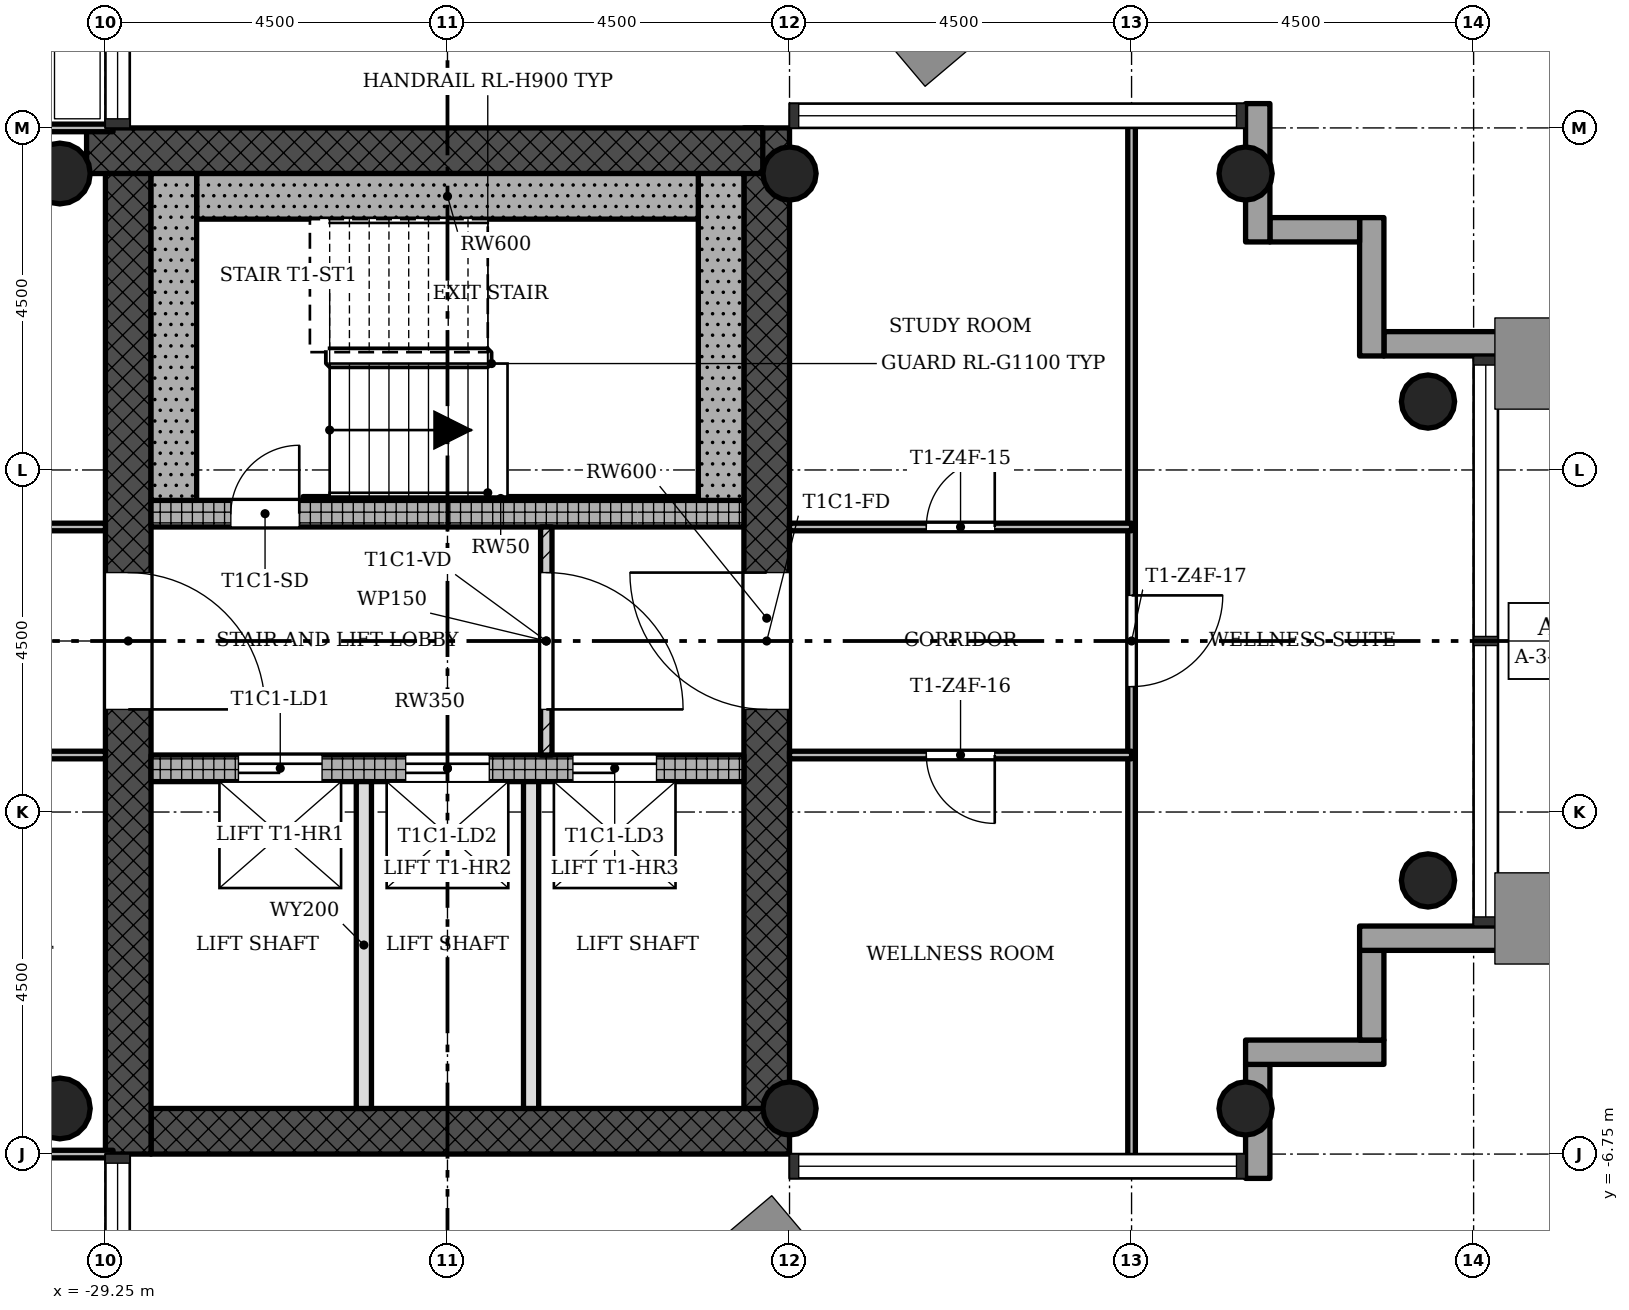
"""IFC4 building model, lengths in metres.
Left out: names, types, materials, properties, quantities, classifications, styles, units other than length and angle.
Written with IfcOpenShell. Run it as: python <this file> out.ifc"""

import sys

from ifc_helpers import new_model, si_unit, direction, frame, frame_2d, origin, origin_2d, place, context, subcontext, project, spatial, rectangle, hollow_circle, extrude, element, fill, save


model = new_model("IFC4")
c1 = context("Model", 3, precision=1e-05, world=origin(), true_north=direction((0.0, 1.0)))
c2 = subcontext(c1, "Body", "Model", "MODEL_VIEW")
j1 = project(units=[si_unit("LENGTHUNIT", "METRE"), si_unit("PLANEANGLEUNIT", "RADIAN")], contexts=[c1])
p1 = place(None, origin())
s1 = spatial("IfcSite", under=j1, at=p1, CompositionType="ELEMENT")
p2 = place(p1, origin())
s2 = spatial("IfcBuilding", under=s1, at=p2, CompositionType="ELEMENT")
p3 = place(p2, frame((0.0, 0.0, 223.2)))
s3 = spatial("IfcBuildingStorey", under=s2, at=p3, CompositionType="ELEMENT", Elevation=223.2)
p4 = place(p3, frame((-28.65, -6.45, 0.0), z_axis=(0.0, 0.0, 1.0), x_axis=(1.0, 0.0, 0.0)))
e1 = element("IfcWall", 1, at=p4, inside=s3, PredefinedType="SHEAR", context=c2, shape_type="SweptSolid", body=[
    extrude(rectangle(XDim=8.4, YDim=0.6, at=frame_2d((4.2, 0.0))), origin(), (0.0, 0.0, 1.0), 3.4),
])
p5 = place(p3, frame((-20.55, -6.15, 0.0), z_axis=(0.0, 0.0, 1.0), x_axis=(0.0, 1.0, 0.0)))
e2 = element("IfcWall", 2, at=p5, inside=s3, PredefinedType="SHEAR", context=c2, shape_type="SweptSolid", body=[
    extrude(rectangle(XDim=12.9, YDim=0.6, at=frame_2d((6.45, 0.0))), origin(), (0.0, 0.0, 1.0), 3.4),
])
p6 = place(p5, frame((5.25, 0.0, 0.0)))
e3 = element("IfcOpeningElement", 3, at=p6, cuts=e2, PredefinedType="OPENING", context=c2, shape_type="SweptSolid", body=[
    extrude(rectangle(XDim=1.8, YDim=2.1, at=frame_2d((0.9, 1.05))), frame((0.0, 0.31, 0.0), z_axis=(0.0, -1.0, 0.0), x_axis=(1.0, 0.0, 0.0)), (0.0, 0.0, 1.0), 0.62),
])
p7 = place(p3, frame((-20.602, 6.45, 0.0), z_axis=(0.0, 0.0, 1.0), x_axis=(-1.0, 0.0, 0.0)))
e4 = element("IfcWall", 4, at=p7, inside=s3, PredefinedType="SHEAR", context=c2, shape_type="SweptSolid", body=[
    extrude(rectangle(XDim=8.896, YDim=0.6, at=frame_2d((4.448, 0.0))), origin(), (0.0, 0.0, 1.0), 3.4),
])
p8 = place(p3, frame((-28.95, 6.15, 0.0), z_axis=(0.0, 0.0, 1.0), x_axis=(0.0, -1.0, 0.0)))
e5 = element("IfcWall", 5, at=p8, inside=s3, PredefinedType="SHEAR", context=c2, shape_type="SweptSolid", body=[
    extrude(rectangle(XDim=12.9, YDim=0.6, at=frame_2d((6.45, 0.0))), origin(), (0.0, 0.0, 1.0), 3.4),
])
p9 = place(p8, frame((5.25, 0.0, 0.0)))
e6 = element("IfcOpeningElement", 6, at=p9, cuts=e5, PredefinedType="OPENING", context=c2, shape_type="SweptSolid", body=[
    extrude(rectangle(XDim=1.8, YDim=2.1, at=frame_2d((0.9, 1.05))), frame((0.0, 0.31, 0.0), z_axis=(0.0, -1.0, 0.0), x_axis=(1.0, 0.0, 0.0)), (0.0, 0.0, 1.0), 0.62),
])
p10 = place(p3, frame((-28.65, -1.675, 0.0), z_axis=(0.0, 0.0, 1.0), x_axis=(1.0, 0.0, 0.0)))
e7 = element("IfcWall", 7, at=p10, inside=s3, PredefinedType="SHEAR", context=c2, shape_type="SweptSolid", body=[
    extrude(rectangle(XDim=7.8, YDim=0.35, at=frame_2d((3.9, 0.0))), origin(), (0.0, 0.0, 1.0), 3.4),
])
p11 = place(p10, frame((1.15, 0.0, 0.0)))
e8 = element("IfcOpeningElement", 8, at=p11, cuts=e7, PredefinedType="OPENING", context=c2, shape_type="SweptSolid", body=[
    extrude(rectangle(XDim=1.1, YDim=2.1, at=frame_2d((0.55, 1.05))), frame((0.0, 0.185, 0.0), z_axis=(0.0, -1.0, 0.0), x_axis=(1.0, 0.0, 0.0)), (0.0, 0.0, 1.0), 0.37),
])
p12 = place(p10, frame((3.35, 0.0, 0.0)))
e9 = element("IfcOpeningElement", 9, at=p12, cuts=e7, PredefinedType="OPENING", context=c2, shape_type="SweptSolid", body=[
    extrude(rectangle(XDim=1.1, YDim=2.1, at=frame_2d((0.55, 1.05))), frame((0.0, 0.185, 0.0), z_axis=(0.0, -1.0, 0.0), x_axis=(1.0, 0.0, 0.0)), (0.0, 0.0, 1.0), 0.37),
])
p13 = place(p10, frame((5.55, 0.0, 0.0)))
e10 = element("IfcOpeningElement", 10, at=p13, cuts=e7, PredefinedType="OPENING", context=c2, shape_type="SweptSolid", body=[
    extrude(rectangle(XDim=1.1, YDim=2.1, at=frame_2d((0.55, 1.05))), frame((0.0, 0.185, 0.0), z_axis=(0.0, -1.0, 0.0), x_axis=(1.0, 0.0, 0.0)), (0.0, 0.0, 1.0), 0.37),
])
p14 = place(p3, frame((-28.65, 1.675, 0.0), z_axis=(0.0, 0.0, 1.0), x_axis=(1.0, 0.0, 0.0)))
e11 = element("IfcWall", 11, at=p14, inside=s3, PredefinedType="SHEAR", context=c2, shape_type="SweptSolid", body=[
    extrude(rectangle(XDim=7.8, YDim=0.35, at=frame_2d((3.9, 0.0))), origin(), (0.0, 0.0, 1.0), 3.4),
])
p15 = place(p14, frame((1.05, 0.0, 0.0)))
e12 = element("IfcOpeningElement", 12, at=p15, cuts=e11, PredefinedType="OPENING", context=c2, shape_type="SweptSolid", body=[
    extrude(rectangle(XDim=0.9, YDim=2.1, at=frame_2d((0.45, 1.05))), frame((0.0, 0.185, 0.0), z_axis=(0.0, -1.0, 0.0), x_axis=(1.0, 0.0, 0.0)), (0.0, 0.0, 1.0), 0.37),
])
for number, where, z_axis, x_axis in (
    (13, (-20.25, -6.15, 0.0), (0.0, 0.0, 1.0), (1.0, 0.0, 0.0)),
    (14, (-20.25, 6.15, 0.0), (0.0, 0.0, 1.0), (1.0, 0.0, 0.0)),
    (15, (-14.25, -6.15, 0.0), (0.0, 0.0, 1.0), (1.0, 0.0, 0.0)),
    (16, (-14.25, 6.15, 0.0), (0.0, 0.0, 1.0), (1.0, 0.0, 0.0)),
    (17, (-11.85, -3.15, 0.0), (0.0, 0.0, 1.0), (1.0, 0.0, 0.0)),
    (18, (-11.85, 3.15, 0.0), (0.0, 0.0, 1.0), (1.0, 0.0, 0.0)),
):
    element("IfcColumn", number, at=place(p3, frame(where, z_axis=z_axis, x_axis=x_axis)), inside=s3, PredefinedType="COLUMN", context=c2, shape_type="SweptSolid", body=[
        extrude(hollow_circle(Radius=0.35, WallThickness=0.025, at=origin_2d()), origin(), (0.0, 0.0, 1.0), 3.4),
    ])
for number, where, z_axis, x_axis in (
    (19, (-29.85, -6.15, 0.0), (0.0, 0.0, 1.0), (1.0, 0.0, 0.0)),
    (20, (-29.85, 6.15, 0.0), (0.0, 0.0, 1.0), (1.0, 0.0, 0.0)),
):
    element("IfcColumn", number, at=place(p3, frame(where, z_axis=z_axis, x_axis=x_axis)), inside=s3, PredefinedType="COLUMN", context=c2, shape_type="SweptSolid", body=[
        extrude(hollow_circle(Radius=0.4, WallThickness=0.028, at=origin_2d()), origin(), (0.0, 0.0, 1.0), 3.4),
    ])
p16 = place(p3, frame((-14.09, -7.07, -0.3), z_axis=(0.0, 0.0, 1.0), x_axis=(0.0, 1.0, 0.0)))
e21 = element("IfcWall", 21, at=p16, inside=s3, PredefinedType="STANDARD", context=c2, shape_type="SweptSolid", body=[
    extrude(rectangle(XDim=1.5, YDim=0.32, at=frame_2d((0.75, 0.0))), origin(), (0.0, 0.0, 1.0), 3.4),
])
p17 = place(p3, frame((-14.25, -5.41, -0.3), z_axis=(0.0, 0.0, 1.0), x_axis=(1.0, 0.0, 0.0)))
e22 = element("IfcWall", 22, at=p17, inside=s3, PredefinedType="STANDARD", context=c2, shape_type="SweptSolid", body=[
    extrude(rectangle(XDim=1.82, YDim=0.32, at=frame_2d((0.91, 0.0))), origin(), (0.0, 0.0, 1.0), 3.4),
])
p18 = place(p3, frame((-12.59, -5.25, -0.3), z_axis=(0.0, 0.0, 1.0), x_axis=(0.0, 1.0, 0.0)))
e23 = element("IfcWall", 23, at=p18, inside=s3, PredefinedType="STANDARD", context=c2, shape_type="SweptSolid", body=[
    extrude(rectangle(XDim=1.18, YDim=0.32, at=frame_2d((0.59, 0.0))), origin(), (0.0, 0.0, 1.0), 3.4),
])
p19 = place(p3, frame((-12.75, -3.91, -0.3), z_axis=(0.0, 0.0, 1.0), x_axis=(1.0, 0.0, 0.0)))
e24 = element("IfcWall", 24, at=p19, inside=s3, PredefinedType="STANDARD", context=c2, shape_type="SweptSolid", body=[
    extrude(rectangle(XDim=1.82, YDim=0.32, at=frame_2d((0.91, 0.0))), origin(), (0.0, 0.0, 1.0), 3.4),
])
p20 = place(p3, frame((-10.93, 3.91, -0.3), z_axis=(0.0, 0.0, 1.0), x_axis=(-1.0, 0.0, 0.0)))
e25 = element("IfcWall", 25, at=p20, inside=s3, PredefinedType="STANDARD", context=c2, shape_type="SweptSolid", body=[
    extrude(rectangle(XDim=1.5, YDim=0.32, at=frame_2d((0.75, 0.0))), origin(), (0.0, 0.0, 1.0), 3.4),
])
p21 = place(p3, frame((-12.59, 3.75, -0.3), z_axis=(0.0, 0.0, 1.0), x_axis=(0.0, 1.0, 0.0)))
e26 = element("IfcWall", 26, at=p21, inside=s3, PredefinedType="STANDARD", context=c2, shape_type="SweptSolid", body=[
    extrude(rectangle(XDim=1.82, YDim=0.32, at=frame_2d((0.91, 0.0))), origin(), (0.0, 0.0, 1.0), 3.4),
])
p22 = place(p3, frame((-12.75, 5.41, -0.3), z_axis=(0.0, 0.0, 1.0), x_axis=(-1.0, 0.0, 0.0)))
e27 = element("IfcWall", 27, at=p22, inside=s3, PredefinedType="STANDARD", context=c2, shape_type="SweptSolid", body=[
    extrude(rectangle(XDim=1.18, YDim=0.32, at=frame_2d((0.59, 0.0))), origin(), (0.0, 0.0, 1.0), 3.4),
])
p23 = place(p3, frame((-14.09, 5.25, -0.3), z_axis=(0.0, 0.0, 1.0), x_axis=(0.0, 1.0, 0.0)))
e28 = element("IfcWall", 28, at=p23, inside=s3, PredefinedType="STANDARD", context=c2, shape_type="SweptSolid", body=[
    extrude(rectangle(XDim=1.82, YDim=0.32, at=frame_2d((0.91, 0.0))), origin(), (0.0, 0.0, 1.0), 3.4),
])
p24 = place(p3, frame((-23.45, -1.5, 0.0), z_axis=(0.0, 0.0, 1.0), x_axis=(0.0, 1.0, 0.0)))
e29 = element("IfcWall", 29, at=p24, inside=s3, PredefinedType="PARTITIONING", context=c2, shape_type="SweptSolid", body=[
    extrude(rectangle(XDim=3.0, YDim=0.15, at=frame_2d((1.5, 0.0))), origin(), (0.0, 0.0, 1.0), 3.0),
])
p25 = place(p24, frame((0.6, 0.0, 0.0)))
e30 = element("IfcOpeningElement", 30, at=p25, cuts=e29, PredefinedType="OPENING", context=c2, shape_type="SweptSolid", body=[
    extrude(rectangle(XDim=1.8, YDim=2.1, at=frame_2d((0.9, 1.05))), frame((0.0, 0.085, 0.0), z_axis=(0.0, -1.0, 0.0), x_axis=(1.0, 0.0, 0.0)), (0.0, 0.0, 1.0), 0.17),
])
for number, where, z_axis, x_axis in (
    (31, (-25.85, -6.15, 0.0), (0.0, 0.0, 1.0), (0.0, 1.0, 0.0)),
    (32, (-23.65, -6.15, 0.0), (0.0, 0.0, 1.0), (0.0, 1.0, 0.0)),
):
    element("IfcWall", number, at=place(p3, frame(where, z_axis=z_axis, x_axis=x_axis)), inside=s3, PredefinedType="SOLIDWALL", context=c2, shape_type="SweptSolid", body=[
        extrude(rectangle(XDim=4.3, YDim=0.2, at=frame_2d((2.15, 0.0))), origin(), (0.0, 0.0, 1.0), 3.0),
    ])
p26 = place(p3, frame((-15.75, -6.85, 0.0), z_axis=(0.0, 0.0, 1.0), x_axis=(0.0, 1.0, 0.0)))
e33 = element("IfcWall", 33, at=p26, inside=s3, PredefinedType="PARTITIONING", context=c2, shape_type="SweptSolid", body=[
    extrude(rectangle(XDim=13.7, YDim=0.1, at=frame_2d((6.85, 0.0))), origin(), (0.0, 0.0, 1.0), 3.0),
])
p27 = place(p26, frame((6.25, 0.0, 0.0)))
e34 = element("IfcOpeningElement", 34, at=p27, cuts=e33, PredefinedType="OPENING", context=c2, shape_type="SweptSolid", body=[
    extrude(rectangle(XDim=1.2, YDim=2.1, at=frame_2d((0.6, 1.05))), frame((0.0, 0.06, 0.0), z_axis=(0.0, -1.0, 0.0), x_axis=(1.0, 0.0, 0.0)), (0.0, 0.0, 1.0), 0.12),
])
p28 = place(p3, frame((-35.1, -6.75, 0.0), z_axis=(0.0, 0.0, 1.0), x_axis=(1.0, 0.0, 0.0)))
e35 = element("IfcWall", 35, at=p28, inside=s3, PredefinedType="PARTITIONING", context=c2, shape_type="SweptSolid", body=[
    extrude(rectangle(XDim=5.95, YDim=0.1, at=frame_2d((2.975, 0.0))), origin(), (0.0, 0.0, 1.0), 3.0),
])
p29 = place(p3, frame((-31.5, -1.5, 0.0), z_axis=(0.0, 0.0, 1.0), x_axis=(1.0, 0.0, 0.0)))
e36 = element("IfcWall", 36, at=p29, inside=s3, PredefinedType="PARTITIONING", context=c2, shape_type="SweptSolid", body=[
    extrude(rectangle(XDim=2.25, YDim=0.1, at=frame_2d((1.125, 0.0))), origin(), (0.0, 0.0, 1.0), 3.0),
])
p30 = place(p3, frame((-20.25, -1.5, 0.0), z_axis=(0.0, 0.0, 1.0), x_axis=(1.0, 0.0, 0.0)))
e37 = element("IfcWall", 37, at=p30, inside=s3, PredefinedType="PARTITIONING", context=c2, shape_type="SweptSolid", body=[
    extrude(rectangle(XDim=4.5, YDim=0.1, at=frame_2d((2.25, 0.0))), origin(), (0.0, 0.0, 1.0), 3.0),
])
p31 = place(p30, frame((1.8, 0.0, 0.0)))
e38 = element("IfcOpeningElement", 38, at=p31, cuts=e37, PredefinedType="OPENING", context=c2, shape_type="SweptSolid", body=[
    extrude(rectangle(XDim=0.9, YDim=2.1, at=frame_2d((0.45, 1.05))), frame((0.0, 0.06, 0.0), z_axis=(0.0, -1.0, 0.0), x_axis=(1.0, 0.0, 0.0)), (0.0, 0.0, 1.0), 0.12),
])
p32 = place(p3, frame((-31.5, 1.5, 0.0), z_axis=(0.0, 0.0, 1.0), x_axis=(1.0, 0.0, 0.0)))
e39 = element("IfcWall", 39, at=p32, inside=s3, PredefinedType="PARTITIONING", context=c2, shape_type="SweptSolid", body=[
    extrude(rectangle(XDim=2.25, YDim=0.1, at=frame_2d((1.125, 0.0))), origin(), (0.0, 0.0, 1.0), 3.0),
])
p33 = place(p3, frame((-20.25, 1.5, 0.0), z_axis=(0.0, 0.0, 1.0), x_axis=(1.0, 0.0, 0.0)))
e40 = element("IfcWall", 40, at=p33, inside=s3, PredefinedType="PARTITIONING", context=c2, shape_type="SweptSolid", body=[
    extrude(rectangle(XDim=4.5, YDim=0.1, at=frame_2d((2.25, 0.0))), origin(), (0.0, 0.0, 1.0), 3.0),
])
p34 = place(p33, frame((1.8, 0.0, 0.0)))
e41 = element("IfcOpeningElement", 41, at=p34, cuts=e40, PredefinedType="OPENING", context=c2, shape_type="SweptSolid", body=[
    extrude(rectangle(XDim=0.9, YDim=2.1, at=frame_2d((0.45, 1.05))), frame((0.0, 0.06, 0.0), z_axis=(0.0, -1.0, 0.0), x_axis=(1.0, 0.0, 0.0)), (0.0, 0.0, 1.0), 0.12),
])
p35 = place(p3, frame((-35.1, 6.75, 0.0), z_axis=(0.0, 0.0, 1.0), x_axis=(1.0, 0.0, 0.0)))
e42 = element("IfcWall", 42, at=p35, inside=s3, PredefinedType="PARTITIONING", context=c2, shape_type="SweptSolid", body=[
    extrude(rectangle(XDim=5.95, YDim=0.1, at=frame_2d((2.975, 0.0))), origin(), (0.0, 0.0, 1.0), 3.0),
])
p36 = place(p3, frame((-21.15, 1.85, 0.0), z_axis=(0.0, 0.0, 1.0), x_axis=(0.0, 1.0, 0.0)))
e43 = element("IfcWall", 43, at=p36, inside=s3, PredefinedType="SHEAR", context=c2, shape_type="SweptSolid", body=[
    extrude(rectangle(XDim=4.3, YDim=0.6, at=frame_2d((2.15, 0.0))), origin(), (0.0, 0.0, 1.0), 3.4),
])
p37 = place(p3, frame((-28.05, 5.85, 0.0), z_axis=(0.0, 0.0, 1.0), x_axis=(1.0, 0.0, 0.0)))
e44 = element("IfcWall", 44, at=p37, inside=s3, PredefinedType="SHEAR", context=c2, shape_type="SweptSolid", body=[
    extrude(rectangle(XDim=6.6, YDim=0.6, at=frame_2d((3.3, 0.0))), origin(), (0.0, 0.0, 1.0), 3.4),
])
p38 = place(p3, frame((-28.35, 1.85, 0.0), z_axis=(0.0, 0.0, 1.0), x_axis=(0.0, 1.0, 0.0)))
e45 = element("IfcWall", 45, at=p38, inside=s3, PredefinedType="SHEAR", context=c2, shape_type="SweptSolid", body=[
    extrude(rectangle(XDim=4.3, YDim=0.6, at=frame_2d((2.15, 0.0))), origin(), (0.0, 0.0, 1.0), 3.4),
])
p39 = place(p3, frame((-26.65, 1.875, 0.0), z_axis=(0.0, 0.0, 1.0), x_axis=(1.0, 0.0, 0.0)))
e46 = element("IfcWall", 46, at=p39, inside=s3, PredefinedType="SHEAR", context=c2, shape_type="SweptSolid", body=[
    extrude(rectangle(XDim=5.2, YDim=0.05, at=frame_2d((2.6, 0.0))), origin(), (0.0, 0.0, 1.0), 3.4),
])
p40 = place(p25, origin())
e47 = element("IfcDoor", 47, at=p40, inside=s3, OperationType="SINGLE_SWING_LEFT", PredefinedType="DOOR", context=c2, shape_type="SweptSolid", body=[
    extrude(rectangle(XDim=1.8, YDim=2.1, at=frame_2d((0.9, 1.05))), frame((0.0, 0.025, 0.0), z_axis=(0.0, -1.0, 0.0), x_axis=(1.0, 0.0, 0.0)), (0.0, 0.0, 1.0), 0.05),
])
fill(e30, e47)
p41 = place(p34, origin())
e48 = element("IfcDoor", 48, at=p41, inside=s3, OperationType="SINGLE_SWING_LEFT", PredefinedType="DOOR", context=c2, shape_type="SweptSolid", body=[
    extrude(rectangle(XDim=0.9, YDim=2.1, at=frame_2d((0.45, 1.05))), frame((0.0, 0.025, 0.0), z_axis=(0.0, -1.0, 0.0), x_axis=(1.0, 0.0, 0.0)), (0.0, 0.0, 1.0), 0.05),
])
fill(e41, e48)
p42 = place(p31, origin())
e49 = element("IfcDoor", 49, at=p42, inside=s3, OperationType="SINGLE_SWING_RIGHT", PredefinedType="DOOR", context=c2, shape_type="SweptSolid", body=[
    extrude(rectangle(XDim=0.9, YDim=2.1, at=frame_2d((0.45, 1.05))), frame((0.0, 0.025, 0.0), z_axis=(0.0, -1.0, 0.0), x_axis=(1.0, 0.0, 0.0)), (0.0, 0.0, 1.0), 0.05),
])
fill(e38, e49)
p43 = place(p27, origin())
e50 = element("IfcDoor", 50, at=p43, inside=s3, OperationType="SINGLE_SWING_RIGHT", PredefinedType="DOOR", context=c2, shape_type="SweptSolid", body=[
    extrude(rectangle(XDim=1.2, YDim=2.1, at=frame_2d((0.6, 1.05))), frame((0.0, 0.025, 0.0), z_axis=(0.0, -1.0, 0.0), x_axis=(1.0, 0.0, 0.0)), (0.0, 0.0, 1.0), 0.05),
])
fill(e34, e50)
p44 = place(p15, origin())
e51 = element("IfcDoor", 51, at=p44, inside=s3, OperationType="SINGLE_SWING_LEFT", PredefinedType="DOOR", context=c2, shape_type="SweptSolid", body=[
    extrude(rectangle(XDim=0.9, YDim=2.1, at=frame_2d((0.45, 1.05))), frame((0.0, 0.025, 0.0), z_axis=(0.0, -1.0, 0.0), x_axis=(1.0, 0.0, 0.0)), (0.0, 0.0, 1.0), 0.05),
])
fill(e12, e51)
p45 = place(p11, origin())
e52 = element("IfcDoor", 52, at=p45, inside=s3, OperationType="SLIDING_TO_LEFT", PredefinedType="DOOR", context=c2, shape_type="SweptSolid", body=[
    extrude(rectangle(XDim=1.1, YDim=2.1, at=frame_2d((0.55, 1.05))), frame((0.0, 0.025, 0.0), z_axis=(0.0, -1.0, 0.0), x_axis=(1.0, 0.0, 0.0)), (0.0, 0.0, 1.0), 0.05),
])
fill(e8, e52)
p46 = place(p12, origin())
e53 = element("IfcDoor", 53, at=p46, inside=s3, OperationType="SLIDING_TO_LEFT", PredefinedType="DOOR", context=c2, shape_type="SweptSolid", body=[
    extrude(rectangle(XDim=1.1, YDim=2.1, at=frame_2d((0.55, 1.05))), frame((0.0, 0.025, 0.0), z_axis=(0.0, -1.0, 0.0), x_axis=(1.0, 0.0, 0.0)), (0.0, 0.0, 1.0), 0.05),
])
fill(e9, e53)
p47 = place(p13, origin())
e54 = element("IfcDoor", 54, at=p47, inside=s3, OperationType="SLIDING_TO_LEFT", PredefinedType="DOOR", context=c2, shape_type="SweptSolid", body=[
    extrude(rectangle(XDim=1.1, YDim=2.1, at=frame_2d((0.55, 1.05))), frame((0.0, 0.025, 0.0), z_axis=(0.0, -1.0, 0.0), x_axis=(1.0, 0.0, 0.0)), (0.0, 0.0, 1.0), 0.05),
])
fill(e10, e54)
p48 = place(p9, origin())
e55 = element("IfcDoor", 55, at=p48, inside=s3, OperationType="SINGLE_SWING_LEFT", PredefinedType="DOOR", context=c2, shape_type="SweptSolid", body=[
    extrude(rectangle(XDim=1.8, YDim=2.1, at=frame_2d((0.9, 1.05))), frame((0.0, 0.025, 0.0), z_axis=(0.0, -1.0, 0.0), x_axis=(1.0, 0.0, 0.0)), (0.0, 0.0, 1.0), 0.05),
])
fill(e6, e55)
p49 = place(p6, origin())
e56 = element("IfcDoor", 56, at=p49, inside=s3, OperationType="SINGLE_SWING_LEFT", PredefinedType="DOOR", context=c2, shape_type="SweptSolid", body=[
    extrude(rectangle(XDim=1.8, YDim=2.1, at=frame_2d((0.9, 1.05))), frame((0.0, 0.025, 0.0), z_axis=(0.0, -1.0, 0.0), x_axis=(1.0, 0.0, 0.0)), (0.0, 0.0, 1.0), 0.05),
])
fill(e3, e56)
save(model, sys.argv[1])
